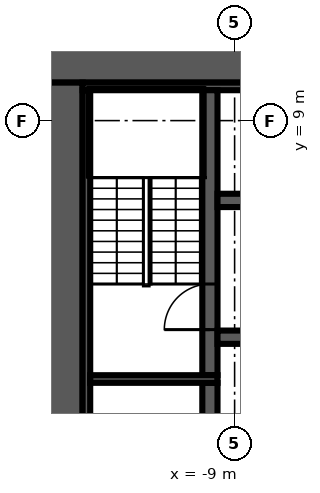
"""IFC4 building model, lengths in metres.
Left out: names, types, materials, properties, quantities, classifications, styles, units other than length and angle.
Written with IfcOpenShell. Run it as: python <this file> out.ifc"""

import sys

from ifc_helpers import new_model, si_unit, direction, frame, frame_2d, origin, place, context, subcontext, project, spatial, rectangle, extrude, element, fill, save


model = new_model("IFC4")
c1 = context("Model", 3, precision=1e-05, world=origin(), true_north=direction((0.0, 1.0)))
c2 = subcontext(c1, "Body", "Model", "MODEL_VIEW")
j1 = project(units=[si_unit("LENGTHUNIT", "METRE"), si_unit("PLANEANGLEUNIT", "RADIAN")], contexts=[c1])
p1 = place(None, origin())
s1 = spatial("IfcSite", under=j1, at=p1, CompositionType="ELEMENT")
p2 = place(p1, origin())
s2 = spatial("IfcBuilding", under=s1, at=p2, CompositionType="ELEMENT")
p3 = place(p2, frame((0.0, 0.0, 95.2)))
s3 = spatial("IfcBuildingStorey", under=s2, at=p3, CompositionType="ELEMENT", Elevation=95.2)
p4 = place(p3, frame((-14.0, 10.5, 0.0), z_axis=(0.0, 0.0, 1.0), x_axis=(1.0, 0.0, 0.0)))
e1 = element("IfcWall", 1, at=p4, inside=s3, PredefinedType="SHEAR", context=c2, shape_type="SweptSolid", body=[
    extrude(rectangle(XDim=28.0, YDim=1.0, at=frame_2d((14.0, 0.0))), origin(), (0.0, 0.0, 1.0), 3.25),
])
p5 = place(p4, frame((15.9, 0.0, 0.0)))
e2 = element("IfcOpeningElement", 2, at=p5, cuts=e1, PredefinedType="OPENING", context=c2, shape_type="SweptSolid", body=[
    extrude(rectangle(XDim=1.6, YDim=2.1, at=frame_2d((0.8, 1.05))), frame((0.0, 0.51, 0.0), z_axis=(0.0, -1.0, 0.0), x_axis=(1.0, 0.0, 0.0)), (0.0, 0.0, 1.0), 1.02),
])
p6 = place(p3, frame((-13.5, -10.0, 0.0), z_axis=(0.0, 0.0, 1.0), x_axis=(0.0, 1.0, 0.0)))
e3 = element("IfcWall", 3, at=p6, inside=s3, PredefinedType="SHEAR", context=c2, shape_type="SweptSolid", body=[
    extrude(rectangle(XDim=20.0, YDim=1.0, at=frame_2d((10.0, 0.0))), origin(), (0.0, 0.0, 1.0), 3.25),
])
p7 = place(p3, frame((-13.0, 9.9, 0.0), z_axis=(0.0, 0.0, 1.0), x_axis=(1.0, 0.0, 0.0)))
e4 = element("IfcWall", 4, at=p7, inside=s3, PredefinedType="SHEAR", context=c2, shape_type="SweptSolid", body=[
    extrude(rectangle(XDim=14.5, YDim=0.2, at=frame_2d((7.25, 0.0))), origin(), (0.0, 0.0, 1.0), 3.25),
])
p8 = place(p3, frame((-12.9, -9.8, 0.0), z_axis=(0.0, 0.0, 1.0), x_axis=(0.0, 1.0, 0.0)))
e5 = element("IfcWall", 5, at=p8, inside=s3, PredefinedType="SHEAR", context=c2, shape_type="SweptSolid", body=[
    extrude(rectangle(XDim=19.6, YDim=0.2, at=frame_2d((9.8, 0.0))), origin(), (0.0, 0.0, 1.0), 3.25),
])
p9 = place(p3, frame((-9.65, -2.1, 0.0), z_axis=(0.0, 0.0, 1.0), x_axis=(0.0, 1.0, 0.0)))
e6 = element("IfcWall", 6, at=p9, inside=s3, PredefinedType="SHEAR", context=c2, shape_type="SweptSolid", body=[
    extrude(rectangle(XDim=4.2, YDim=0.4, at=frame_2d((2.1, 0.0))), origin(), (0.0, 0.0, 1.0), 3.25),
])
p10 = place(p3, frame((-9.65, 2.3, 0.0), z_axis=(0.0, 0.0, 1.0), x_axis=(0.0, 1.0, 0.0)))
e7 = element("IfcWall", 7, at=p10, inside=s3, PredefinedType="SHEAR", context=c2, shape_type="SweptSolid", body=[
    extrude(rectangle(XDim=7.5, YDim=0.4, at=frame_2d((3.75, 0.0))), origin(), (0.0, 0.0, 1.0), 3.25),
])
p11 = place(p10, frame((1.2, 0.0, 0.0)))
e8 = element("IfcOpeningElement", 8, at=p11, cuts=e7, PredefinedType="OPENING", context=c2, shape_type="SweptSolid", body=[
    extrude(rectangle(XDim=1.2, YDim=2.1, at=frame_2d((0.6, 1.05))), frame((0.0, 0.21, 0.0), z_axis=(0.0, -1.0, 0.0), x_axis=(1.0, 0.0, 0.0)), (0.0, 0.0, 1.0), 0.42),
])
p12 = place(p3, frame((-9.45, 2.2, 0.0), z_axis=(0.0, 0.0, 1.0), x_axis=(-1.0, 0.0, 0.0)))
e9 = element("IfcWall", 9, at=p12, inside=s3, PredefinedType="SHEAR", context=c2, shape_type="SweptSolid", body=[
    extrude(rectangle(XDim=3.35, YDim=0.2, at=frame_2d((1.675, 0.0))), origin(), (0.0, 0.0, 1.0), 3.25),
])
p13 = place(p3, frame((-9.45, 6.9, 0.0), z_axis=(0.0, 0.0, 1.0), x_axis=(1.0, 0.0, 0.0)))
e10 = element("IfcWall", 10, at=p13, inside=s3, PredefinedType="SHEAR", context=c2, shape_type="SweptSolid", body=[
    extrude(rectangle(XDim=18.9, YDim=0.35, at=frame_2d((9.45, 0.0))), origin(), (0.0, 0.0, 1.0), 3.25),
])
p14 = place(p13, frame((0.8, 0.0, 0.0)))
e11 = element("IfcOpeningElement", 11, at=p14, cuts=e10, PredefinedType="OPENING", context=c2, shape_type="SweptSolid", body=[
    extrude(rectangle(XDim=1.1, YDim=2.1, at=frame_2d((0.55, 1.05))), frame((0.0, 0.185, 0.0), z_axis=(0.0, -1.0, 0.0), x_axis=(1.0, 0.0, 0.0)), (0.0, 0.0, 1.0), 0.37),
])
p15 = place(p13, frame((3.5, 0.0, 0.0)))
e12 = element("IfcOpeningElement", 12, at=p15, cuts=e10, PredefinedType="OPENING", context=c2, shape_type="SweptSolid", body=[
    extrude(rectangle(XDim=1.1, YDim=2.1, at=frame_2d((0.55, 1.05))), frame((0.0, 0.185, 0.0), z_axis=(0.0, -1.0, 0.0), x_axis=(1.0, 0.0, 0.0)), (0.0, 0.0, 1.0), 0.37),
])
p16 = place(p13, frame((6.2, 0.0, 0.0)))
e13 = element("IfcOpeningElement", 13, at=p16, cuts=e10, PredefinedType="OPENING", context=c2, shape_type="SweptSolid", body=[
    extrude(rectangle(XDim=1.1, YDim=2.1, at=frame_2d((0.55, 1.05))), frame((0.0, 0.185, 0.0), z_axis=(0.0, -1.0, 0.0), x_axis=(1.0, 0.0, 0.0)), (0.0, 0.0, 1.0), 0.37),
])
p17 = place(p13, frame((8.9, 0.0, 0.0)))
e14 = element("IfcOpeningElement", 14, at=p17, cuts=e10, PredefinedType="OPENING", context=c2, shape_type="SweptSolid", body=[
    extrude(rectangle(XDim=1.1, YDim=2.1, at=frame_2d((0.55, 1.05))), frame((0.0, 0.185, 0.0), z_axis=(0.0, -1.0, 0.0), x_axis=(1.0, 0.0, 0.0)), (0.0, 0.0, 1.0), 0.37),
])
p18 = place(p13, frame((11.55, 0.0, 0.0)))
e15 = element("IfcOpeningElement", 15, at=p18, cuts=e10, PredefinedType="OPENING", context=c2, shape_type="SweptSolid", body=[
    extrude(rectangle(XDim=1.2, YDim=2.1, at=frame_2d((0.6, 1.05))), frame((0.0, 0.185, 0.0), z_axis=(0.0, -1.0, 0.0), x_axis=(1.0, 0.0, 0.0)), (0.0, 0.0, 1.0), 0.37),
])
p19 = place(p13, frame((14.3, 0.0, 0.0)))
e16 = element("IfcOpeningElement", 16, at=p19, cuts=e10, PredefinedType="OPENING", context=c2, shape_type="SweptSolid", body=[
    extrude(rectangle(XDim=1.1, YDim=2.1, at=frame_2d((0.55, 1.05))), frame((0.0, 0.185, 0.0), z_axis=(0.0, -1.0, 0.0), x_axis=(1.0, 0.0, 0.0)), (0.0, 0.0, 1.0), 0.37),
])
p20 = place(p13, frame((17.0, 0.0, 0.0)))
e17 = element("IfcOpeningElement", 17, at=p20, cuts=e10, PredefinedType="OPENING", context=c2, shape_type="SweptSolid", body=[
    extrude(rectangle(XDim=1.1, YDim=2.1, at=frame_2d((0.55, 1.05))), frame((0.0, 0.185, 0.0), z_axis=(0.0, -1.0, 0.0), x_axis=(1.0, 0.0, 0.0)), (0.0, 0.0, 1.0), 0.37),
])
p21 = place(p3, frame((9.45, 3.3, 0.0), z_axis=(0.0, 0.0, 1.0), x_axis=(-1.0, 0.0, 0.0)))
e18 = element("IfcWall", 18, at=p21, inside=s3, PredefinedType="SHEAR", context=c2, shape_type="SweptSolid", body=[
    extrude(rectangle(XDim=18.9, YDim=0.35, at=frame_2d((9.45, 0.0))), origin(), (0.0, 0.0, 1.0), 3.25),
])
p22 = place(p21, frame((17.0, 0.0, 0.0)))
e19 = element("IfcOpeningElement", 19, at=p22, cuts=e18, PredefinedType="OPENING", context=c2, shape_type="SweptSolid", body=[
    extrude(rectangle(XDim=1.1, YDim=2.1, at=frame_2d((0.55, 1.05))), frame((0.0, 0.185, 0.0), z_axis=(0.0, -1.0, 0.0), x_axis=(1.0, 0.0, 0.0)), (0.0, 0.0, 1.0), 0.37),
])
p23 = place(p21, frame((14.3, 0.0, 0.0)))
e20 = element("IfcOpeningElement", 20, at=p23, cuts=e18, PredefinedType="OPENING", context=c2, shape_type="SweptSolid", body=[
    extrude(rectangle(XDim=1.1, YDim=2.1, at=frame_2d((0.55, 1.05))), frame((0.0, 0.185, 0.0), z_axis=(0.0, -1.0, 0.0), x_axis=(1.0, 0.0, 0.0)), (0.0, 0.0, 1.0), 0.37),
])
p24 = place(p21, frame((11.6, 0.0, 0.0)))
e21 = element("IfcOpeningElement", 21, at=p24, cuts=e18, PredefinedType="OPENING", context=c2, shape_type="SweptSolid", body=[
    extrude(rectangle(XDim=1.1, YDim=2.1, at=frame_2d((0.55, 1.05))), frame((0.0, 0.185, 0.0), z_axis=(0.0, -1.0, 0.0), x_axis=(1.0, 0.0, 0.0)), (0.0, 0.0, 1.0), 0.37),
])
p25 = place(p21, frame((8.9, 0.0, 0.0)))
e22 = element("IfcOpeningElement", 22, at=p25, cuts=e18, PredefinedType="OPENING", context=c2, shape_type="SweptSolid", body=[
    extrude(rectangle(XDim=1.1, YDim=2.1, at=frame_2d((0.55, 1.05))), frame((0.0, 0.185, 0.0), z_axis=(0.0, -1.0, 0.0), x_axis=(1.0, 0.0, 0.0)), (0.0, 0.0, 1.0), 0.37),
])
p26 = place(p21, frame((6.2, 0.0, 0.0)))
e23 = element("IfcOpeningElement", 23, at=p26, cuts=e18, PredefinedType="OPENING", context=c2, shape_type="SweptSolid", body=[
    extrude(rectangle(XDim=1.1, YDim=2.1, at=frame_2d((0.55, 1.05))), frame((0.0, 0.185, 0.0), z_axis=(0.0, -1.0, 0.0), x_axis=(1.0, 0.0, 0.0)), (0.0, 0.0, 1.0), 0.37),
])
p27 = place(p21, frame((3.5, 0.0, 0.0)))
e24 = element("IfcOpeningElement", 24, at=p27, cuts=e18, PredefinedType="OPENING", context=c2, shape_type="SweptSolid", body=[
    extrude(rectangle(XDim=1.1, YDim=2.1, at=frame_2d((0.55, 1.05))), frame((0.0, 0.185, 0.0), z_axis=(0.0, -1.0, 0.0), x_axis=(1.0, 0.0, 0.0)), (0.0, 0.0, 1.0), 0.37),
])
p28 = place(p21, frame((0.9, 0.0, 0.0)))
e25 = element("IfcOpeningElement", 25, at=p28, cuts=e18, PredefinedType="OPENING", context=c2, shape_type="SweptSolid", body=[
    extrude(rectangle(XDim=0.9, YDim=2.1, at=frame_2d((0.45, 1.05))), frame((0.0, 0.185, 0.0), z_axis=(0.0, -1.0, 0.0), x_axis=(1.0, 0.0, 0.0)), (0.0, 0.0, 1.0), 0.37),
])
p29 = place(p11, origin())
e26 = element("IfcDoor", 26, at=p29, inside=s3, OperationType="SINGLE_SWING_RIGHT", PredefinedType="DOOR", context=c2, shape_type="SweptSolid", body=[
    extrude(rectangle(XDim=1.2, YDim=2.1, at=frame_2d((0.6, 1.05))), frame((0.0, 0.025, 0.0), z_axis=(0.0, -1.0, 0.0), x_axis=(1.0, 0.0, 0.0)), (0.0, 0.0, 1.0), 0.05),
])
fill(e8, e26)
save(model, sys.argv[1])
